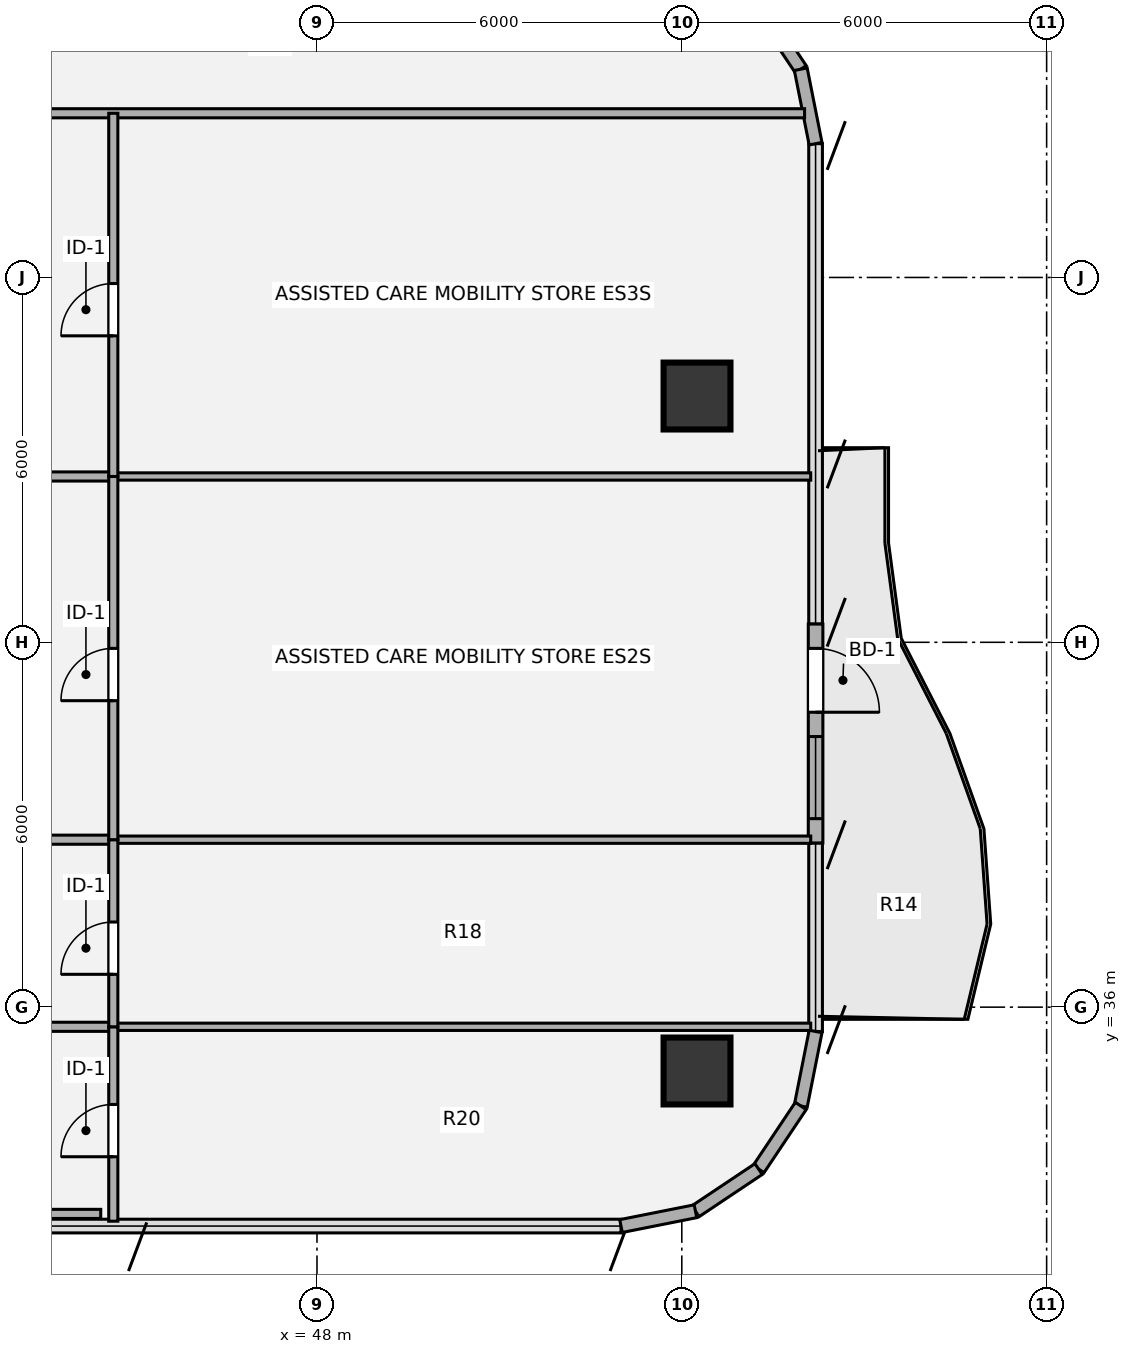
"""IFC4 building model, lengths in metres.
Left out: names, types, materials, properties, quantities, classifications, styles, units other than length and angle.
Written with IfcOpenShell. Run it as: python <this file> out.ifc"""

import sys

from ifc_helpers import new_model, si_unit, direction, frame, frame_2d, origin, origin_2d, place, context, subcontext, project, spatial, rectangle, hollow_circle, extrude, source, transform, mapped, element, fill, save


model = new_model("IFC4")
c1 = context("Model", 3, precision=1e-05, world=origin(), true_north=direction((0.0, 1.0)))
c2 = subcontext(c1, "Body", "Model", "MODEL_VIEW")
j1 = project(units=[si_unit("LENGTHUNIT", "METRE"), si_unit("PLANEANGLEUNIT", "RADIAN")], contexts=[c1])
p1 = place(None, origin())
s1 = spatial("IfcSite", under=j1, at=p1, CompositionType="ELEMENT")
p2 = place(p1, origin())
s2 = spatial("IfcBuilding", under=s1, at=p2, CompositionType="ELEMENT")
p3 = place(p2, frame((0.0, 0.0, 167.76)))
s3 = spatial("IfcBuildingStorey", under=s2, at=p3, CompositionType="ELEMENT", Elevation=167.76)
m1 = source(origin(), c2, "Body", "SweptSolid", [
    extrude(hollow_circle(Radius=0.55, WallThickness=0.04, at=origin_2d()), origin(), (0.0, 0.0, 1.0), 3.78),
])
for number, where, z_axis, x_axis in (
    (1, (54.25, 34.95, 0.0), (0.0, 0.0, 1.0), (1.0, 0.0, 0.0)),
    (2, (54.25, 46.05, 0.0), (0.0, 0.0, 1.0), (1.0, 0.0, 0.0)),
):
    element("IfcColumn", number, at=place(p3, frame(where, z_axis=z_axis, x_axis=x_axis)), inside=s3, PredefinedType="COLUMN", context=c2, shape_type="MappedRepresentation", body=[
        mapped(m1, transform((0.0, 0.0, 0.0), x_axis=(1.0, 0.0, 0.0), y_axis=(0.0, 1.0, 0.0), z_axis=(0.0, 0.0, 1.0), scale=1.0)),
    ])
for number, where, z_axis, x_axis in (
    (3, (55.263, 52.463, 0.0), (0.0, 0.0, 1.0), (0.556, -0.831, 0.0)),
    (4, (55.956, 51.425, 0.0), (0.0, 0.0, 1.0), (0.195, -0.981, 0.0)),
):
    element("IfcWall", number, at=place(p3, frame(where, z_axis=z_axis, x_axis=x_axis)), inside=s3, PredefinedType="SOLIDWALL", context=c2, shape_type="SweptSolid", body=[
        extrude(rectangle(XDim=1.249, YDim=0.215, at=frame_2d((0.624, 0.0))), origin(), (0.0, 0.0, 1.0), 3.53),
    ])
p4 = place(p3, frame((56.2, 42.3, 0.0), z_axis=(0.0, 0.0, 1.0), x_axis=(0.0, -1.0, 0.0)))
e5 = element("IfcWall", 5, at=p4, inside=s3, PredefinedType="SOLIDWALL", context=c2, shape_type="SweptSolid", body=[
    extrude(rectangle(XDim=3.6, YDim=0.24, at=frame_2d((1.8, 0.0))), origin(), (0.0, 0.0, 1.0), 3.53),
])
p5 = place(p4, frame((0.4, 0.0, 0.0)))
e6 = element("IfcOpeningElement", 6, at=p5, cuts=e5, PredefinedType="OPENING", context=c2, shape_type="SweptSolid", body=[
    extrude(rectangle(XDim=1.05, YDim=2.15, at=origin_2d()), frame((0.525, 0.13, 1.075), z_axis=(0.0, -1.0, 0.0), x_axis=(1.0, 0.0, 0.0)), (0.0, 0.0, 1.0), 0.26),
])
p6 = place(p4, frame((1.85, 0.0, 0.85)))
e7 = element("IfcOpeningElement", 7, at=p6, cuts=e5, PredefinedType="OPENING", context=c2, shape_type="SweptSolid", body=[
    extrude(rectangle(XDim=1.35, YDim=1.35, at=origin_2d()), frame((0.675, 0.13, 0.675), z_axis=(0.0, -1.0, 0.0), x_axis=(1.0, 0.0, 0.0)), (0.0, 0.0, 1.0), 0.26),
])
for number, where, z_axis, x_axis in (
    (8, (56.2, 35.6, 0.0), (0.0, 0.0, 1.0), (-0.195, -0.981, 0.0)),
    (9, (55.956, 34.375, 0.0), (0.0, 0.0, 1.0), (-0.556, -0.831, 0.0)),
    (10, (55.263, 33.337, 0.0), (0.0, 0.0, 1.0), (-0.831, -0.556, 0.0)),
    (11, (54.225, 32.644, 0.0), (0.0, 0.0, 1.0), (-0.981, -0.195, 0.0)),
):
    element("IfcWall", number, at=place(p3, frame(where, z_axis=z_axis, x_axis=x_axis)), inside=s3, PredefinedType="SOLIDWALL", context=c2, shape_type="SweptSolid", body=[
        extrude(rectangle(XDim=1.249, YDim=0.215, at=frame_2d((0.624, 0.0))), origin(), (0.0, 0.0, 1.0), 3.53),
    ])
p7 = place(p3, frame((38.45, 32.6, 0.0), z_axis=(0.0, 0.0, 1.0), x_axis=(1.0, 0.0, 0.0)))
e12 = element("IfcWall", 12, at=p7, inside=s3, PredefinedType="PARTITIONING", context=c2, shape_type="SweptSolid", body=[
    extrude(rectangle(XDim=5.993, YDim=0.15, at=frame_2d((2.997, 0.0))), origin(), (0.0, 0.0, 1.0), 3.5),
])
p8 = place(p3, frame((38.45, 35.677, 0.0), z_axis=(0.0, 0.0, 1.0), x_axis=(1.0, 0.0, 0.0)))
e13 = element("IfcWall", 13, at=p8, inside=s3, PredefinedType="PARTITIONING", context=c2, shape_type="SweptSolid", body=[
    extrude(rectangle(XDim=6.2, YDim=0.15, at=frame_2d((3.1, 0.0))), origin(), (0.0, 0.0, 1.0), 2.982),
])
p9 = place(p3, frame((44.65, 35.677, 0.0), z_axis=(0.0, 0.0, 1.0), x_axis=(1.0, 0.0, 0.0)))
e14 = element("IfcWall", 14, at=p9, inside=s3, PredefinedType="PARTITIONING", context=c2, shape_type="SweptSolid", body=[
    extrude(rectangle(XDim=11.47, YDim=0.12, at=frame_2d((5.735, 0.0))), origin(), (0.0, 0.0, 1.0), 2.982),
])
p10 = place(p3, frame((38.45, 38.754, 0.0), z_axis=(0.0, 0.0, 1.0), x_axis=(1.0, 0.0, 0.0)))
e15 = element("IfcWall", 15, at=p10, inside=s3, PredefinedType="PARTITIONING", context=c2, shape_type="SweptSolid", body=[
    extrude(rectangle(XDim=6.2, YDim=0.15, at=frame_2d((3.1, 0.0))), origin(), (0.0, 0.0, 1.0), 2.982),
])
p11 = place(p3, frame((44.65, 38.754, 0.0), z_axis=(0.0, 0.0, 1.0), x_axis=(1.0, 0.0, 0.0)))
e16 = element("IfcWall", 16, at=p11, inside=s3, PredefinedType="PARTITIONING", context=c2, shape_type="SweptSolid", body=[
    extrude(rectangle(XDim=11.47, YDim=0.12, at=frame_2d((5.735, 0.0))), origin(), (0.0, 0.0, 1.0), 2.982),
])
p12 = place(p3, frame((38.45, 44.727, 0.0), z_axis=(0.0, 0.0, 1.0), x_axis=(1.0, 0.0, 0.0)))
e17 = element("IfcWall", 17, at=p12, inside=s3, PredefinedType="PARTITIONING", context=c2, shape_type="SweptSolid", body=[
    extrude(rectangle(XDim=6.2, YDim=0.15, at=frame_2d((3.1, 0.0))), origin(), (0.0, 0.0, 1.0), 3.055),
])
p13 = place(p3, frame((44.65, 44.727, 0.0), z_axis=(0.0, 0.0, 1.0), x_axis=(1.0, 0.0, 0.0)))
e18 = element("IfcWall", 18, at=p13, inside=s3, PredefinedType="PARTITIONING", context=c2, shape_type="SweptSolid", body=[
    extrude(rectangle(XDim=11.47, YDim=0.12, at=frame_2d((5.735, 0.0))), origin(), (0.0, 0.0, 1.0), 3.055),
])
p14 = place(p3, frame((38.45, 50.7, 0.0), z_axis=(0.0, 0.0, 1.0), x_axis=(1.0, 0.0, 0.0)))
e19 = element("IfcWall", 19, at=p14, inside=s3, PredefinedType="PARTITIONING", context=c2, shape_type="SweptSolid", body=[
    extrude(rectangle(XDim=17.569, YDim=0.15, at=frame_2d((8.785, 0.0))), origin(), (0.0, 0.0, 1.0), 3.308),
])
p15 = place(p3, frame((44.65, 32.48, 0.0), z_axis=(0.0, 0.0, 1.0), x_axis=(0.0, 1.0, 0.0)))
e20 = element("IfcWall", 20, at=p15, inside=s3, PredefinedType="PARTITIONING", context=c2, shape_type="SweptSolid", body=[
    extrude(rectangle(XDim=3.197, YDim=0.15, at=frame_2d((1.599, 0.0))), origin(), (0.0, 0.0, 1.0), 3.5),
])
p16 = place(p15, frame((1.06, 0.0, 0.0)))
e21 = element("IfcOpeningElement", 21, at=p16, cuts=e20, PredefinedType="OPENING", context=c2, shape_type="SweptSolid", body=[
    extrude(rectangle(XDim=0.86, YDim=2.1, at=origin_2d()), frame((0.43, 0.085, 1.05), z_axis=(0.0, -1.0, 0.0), x_axis=(1.0, 0.0, 0.0)), (0.0, 0.0, 1.0), 0.17),
])
p17 = place(p3, frame((44.65, 35.677, 0.0), z_axis=(0.0, 0.0, 1.0), x_axis=(0.0, 1.0, 0.0)))
e22 = element("IfcWall", 22, at=p17, inside=s3, PredefinedType="PARTITIONING", context=c2, shape_type="SweptSolid", body=[
    extrude(rectangle(XDim=3.077, YDim=0.15, at=frame_2d((1.539, 0.0))), origin(), (0.0, 0.0, 1.0), 3.5),
])
p18 = place(p17, frame((0.863, 0.0, 0.0)))
e23 = element("IfcOpeningElement", 23, at=p18, cuts=e22, PredefinedType="OPENING", context=c2, shape_type="SweptSolid", body=[
    extrude(rectangle(XDim=0.86, YDim=2.1, at=origin_2d()), frame((0.43, 0.085, 1.05), z_axis=(0.0, -1.0, 0.0), x_axis=(1.0, 0.0, 0.0)), (0.0, 0.0, 1.0), 0.17),
])
p19 = place(p3, frame((44.65, 38.754, 0.0), z_axis=(0.0, 0.0, 1.0), x_axis=(0.0, 1.0, 0.0)))
e24 = element("IfcWall", 24, at=p19, inside=s3, PredefinedType="PARTITIONING", context=c2, shape_type="SweptSolid", body=[
    extrude(rectangle(XDim=5.973, YDim=0.15, at=frame_2d((2.987, 0.0))), origin(), (0.0, 0.0, 1.0), 3.5),
])
p20 = place(p19, frame((2.286, 0.0, 0.0)))
e25 = element("IfcOpeningElement", 25, at=p20, cuts=e24, PredefinedType="OPENING", context=c2, shape_type="SweptSolid", body=[
    extrude(rectangle(XDim=0.86, YDim=2.1, at=origin_2d()), frame((0.43, 0.085, 1.05), z_axis=(0.0, -1.0, 0.0), x_axis=(1.0, 0.0, 0.0)), (0.0, 0.0, 1.0), 0.17),
])
p21 = place(p3, frame((44.65, 44.727, 0.0), z_axis=(0.0, 0.0, 1.0), x_axis=(0.0, 1.0, 0.0)))
e26 = element("IfcWall", 26, at=p21, inside=s3, PredefinedType="PARTITIONING", context=c2, shape_type="SweptSolid", body=[
    extrude(rectangle(XDim=5.973, YDim=0.15, at=frame_2d((2.986, 0.0))), origin(), (0.0, 0.0, 1.0), 3.5),
])
p22 = place(p21, frame((2.313, 0.0, 0.0)))
e27 = element("IfcOpeningElement", 27, at=p22, cuts=e26, PredefinedType="OPENING", context=c2, shape_type="SweptSolid", body=[
    extrude(rectangle(XDim=0.86, YDim=2.1, at=origin_2d()), frame((0.43, 0.085, 1.05), z_axis=(0.0, -1.0, 0.0), x_axis=(1.0, 0.0, 0.0)), (0.0, 0.0, 1.0), 0.17),
])
m2 = source(origin(), c2, "Body", "SweptSolid", [
    extrude(rectangle(XDim=1.05, YDim=2.15, at=origin_2d()), frame((0.525, 0.025, 1.075), z_axis=(0.0, -1.0, 0.0), x_axis=(1.0, 0.0, 0.0)), (0.0, 0.0, 1.0), 0.05),
])
p23 = place(p5, origin())
e28 = element("IfcDoor", 28, at=p23, inside=s3, OperationType="SINGLE_SWING_RIGHT", PredefinedType="DOOR", context=c2, shape_type="MappedRepresentation", body=[
    mapped(m2, transform((0.0, 0.0, 0.0), x_axis=(1.0, 0.0, 0.0), y_axis=(0.0, 1.0, 0.0), z_axis=(0.0, 0.0, 1.0), scale=1.0)),
])
fill(e6, e28)
m3 = source(origin(), c2, "Body", "SweptSolid", [
    extrude(rectangle(XDim=1.35, YDim=1.35, at=origin_2d()), frame((0.675, 0.03, 0.675), z_axis=(0.0, -1.0, 0.0), x_axis=(1.0, 0.0, 0.0)), (0.0, 0.0, 1.0), 0.06),
])
p24 = place(p6, origin())
e29 = element("IfcWindow", 29, at=p24, inside=s3, PartitioningType="SINGLE_PANEL", PredefinedType="WINDOW", context=c2, shape_type="MappedRepresentation", body=[
    mapped(m3, transform((0.0, 0.0, 0.0), x_axis=(1.0, 0.0, 0.0), y_axis=(0.0, 1.0, 0.0), z_axis=(0.0, 0.0, 1.0), scale=1.0)),
])
fill(e7, e29)
m4 = source(origin(), c2, "Body", "SweptSolid", [
    extrude(rectangle(XDim=0.86, YDim=2.1, at=origin_2d()), frame((0.43, 0.025, 1.05), z_axis=(0.0, -1.0, 0.0), x_axis=(1.0, 0.0, 0.0)), (0.0, 0.0, 1.0), 0.05),
])
p25 = place(p16, origin())
e30 = element("IfcDoor", 30, at=p25, inside=s3, OperationType="SINGLE_SWING_LEFT", PredefinedType="DOOR", context=c2, shape_type="MappedRepresentation", body=[
    mapped(m4, transform((0.0, 0.0, 0.0), x_axis=(1.0, 0.0, 0.0), y_axis=(0.0, 1.0, 0.0), z_axis=(0.0, 0.0, 1.0), scale=1.0)),
])
fill(e21, e30)
p26 = place(p18, origin())
e31 = element("IfcDoor", 31, at=p26, inside=s3, OperationType="SINGLE_SWING_LEFT", PredefinedType="DOOR", context=c2, shape_type="MappedRepresentation", body=[
    mapped(m4, transform((0.0, 0.0, 0.0), x_axis=(1.0, 0.0, 0.0), y_axis=(0.0, 1.0, 0.0), z_axis=(0.0, 0.0, 1.0), scale=1.0)),
])
fill(e23, e31)
p27 = place(p20, origin())
e32 = element("IfcDoor", 32, at=p27, inside=s3, OperationType="SINGLE_SWING_LEFT", PredefinedType="DOOR", context=c2, shape_type="MappedRepresentation", body=[
    mapped(m4, transform((0.0, 0.0, 0.0), x_axis=(1.0, 0.0, 0.0), y_axis=(0.0, 1.0, 0.0), z_axis=(0.0, 0.0, 1.0), scale=1.0)),
])
fill(e25, e32)
p28 = place(p22, origin())
e33 = element("IfcDoor", 33, at=p28, inside=s3, OperationType="SINGLE_SWING_LEFT", PredefinedType="DOOR", context=c2, shape_type="MappedRepresentation", body=[
    mapped(m4, transform((0.0, 0.0, 0.0), x_axis=(1.0, 0.0, 0.0), y_axis=(0.0, 1.0, 0.0), z_axis=(0.0, 0.0, 1.0), scale=1.0)),
])
fill(e27, e33)
save(model, sys.argv[1])
